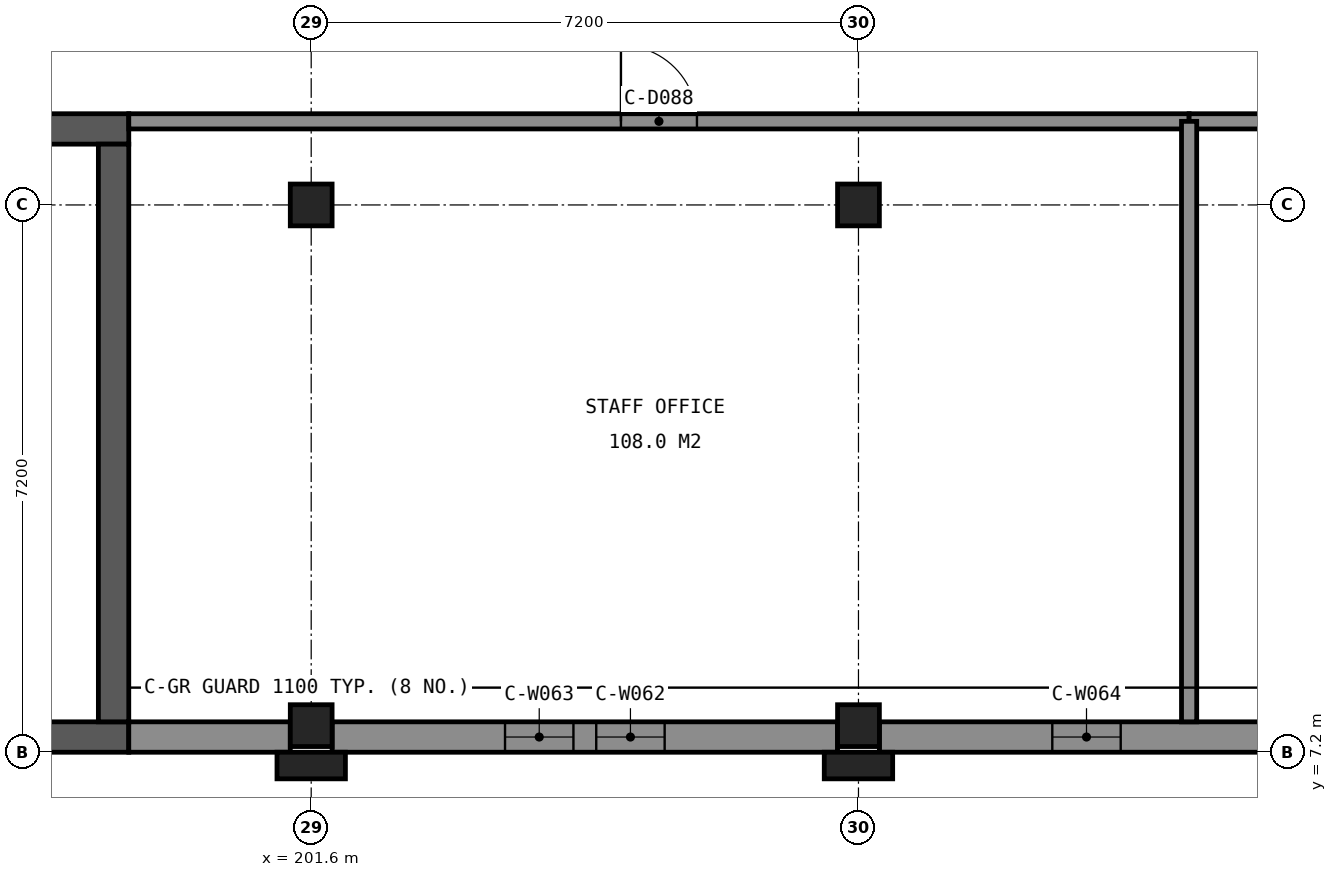
"""IFC4 building model, lengths in metres.
Left out: names, types, materials, properties, quantities, classifications, styles, units other than length and angle.
Written with IfcOpenShell. Run it as: python <this file> out.ifc"""

import sys

from ifc_helpers import new_model, si_unit, direction, frame, frame_2d, origin, origin_2d, place, context, subcontext, project, spatial, polyline, rectangle, outline, extrude, element, fill, save


model = new_model("IFC4")
c1 = context("Model", 3, precision=1e-05, world=origin(), true_north=direction((0.0, 1.0)))
c2 = subcontext(c1, "Body", "Model", "MODEL_VIEW")
j1 = project(units=[si_unit("LENGTHUNIT", "METRE"), si_unit("PLANEANGLEUNIT", "RADIAN")], contexts=[c1])
p1 = place(None, origin())
s1 = spatial("IfcSite", under=j1, at=p1, CompositionType="ELEMENT")
p2 = place(p1, origin())
s2 = spatial("IfcBuilding", under=s1, at=p2, CompositionType="ELEMENT")
p3 = place(p2, frame((0.0, 0.0, 14.4)))
s3 = spatial("IfcBuildingStorey", under=s2, at=p3, CompositionType="ELEMENT", Elevation=14.4)
for number, where, z_axis, x_axis in (
    (1, (201.6, 14.4, 0.0), (0.0, 0.0, 1.0), (1.0, 0.0, 0.0)),
    (2, (208.8, 14.4, 0.0), (0.0, 0.0, 1.0), (1.0, 0.0, 0.0)),
    (3, (201.6, 7.55, 0.0), (0.0, 0.0, 1.0), (1.0, 0.0, 0.0)),
    (4, (208.8, 7.55, 0.0), (0.0, 0.0, 1.0), (1.0, 0.0, 0.0)),
):
    element("IfcColumn", number, at=place(p3, frame(where, z_axis=z_axis, x_axis=x_axis)), inside=s3, PredefinedType="COLUMN", context=c2, shape_type="SweptSolid", body=[
        extrude(rectangle(XDim=0.55, YDim=0.55, at=origin_2d()), origin(), (0.0, 0.0, 1.0), 4.8),
    ])
p4 = place(p3, frame((199.2, 7.4, 0.0), z_axis=(0.0, 0.0, 1.0), x_axis=(-1.0, 0.0, 0.0)))
e5 = element("IfcWall", 5, at=p4, inside=s3, PredefinedType="SHEAR", context=c2, shape_type="SweptSolid", body=[
    extrude(rectangle(XDim=10.8, YDim=0.4, at=frame_2d((5.4, 0.0))), origin(), (0.0, 0.0, 1.0), 4.5),
])
p5 = place(p3, frame((201.325, 7.4, 0.0), z_axis=(0.0, 0.0, 1.0), x_axis=(-1.0, 0.0, 0.0)))
e6 = element("IfcWall", 6, at=p5, inside=s3, PredefinedType="SOLIDWALL", context=c2, shape_type="SweptSolid", body=[
    extrude(rectangle(XDim=2.125, YDim=0.4, at=frame_2d((1.062, 0.0))), origin(), (0.0, 0.0, 1.0), 3.7),
])
p6 = place(p3, frame((208.525, 7.4, 0.0), z_axis=(0.0, 0.0, 1.0), x_axis=(-1.0, 0.0, 0.0)))
e7 = element("IfcWall", 7, at=p6, inside=s3, PredefinedType="SOLIDWALL", context=c2, shape_type="SweptSolid", body=[
    extrude(rectangle(XDim=6.65, YDim=0.4, at=frame_2d((3.325, 0.0))), origin(), (0.0, 0.0, 1.0), 3.7),
])
p7 = place(p6, frame((2.275, 0.0, 1.8)))
e8 = element("IfcOpeningElement", 8, at=p7, cuts=e7, PredefinedType="OPENING", context=c2, shape_type="SweptSolid", body=[
    extrude(rectangle(XDim=0.9, YDim=1.2, at=frame_2d((0.45, 0.6))), frame((0.0, 0.21, 0.0), z_axis=(0.0, -1.0, 0.0), x_axis=(1.0, 0.0, 0.0)), (0.0, 0.0, 1.0), 0.42),
])
p8 = place(p6, frame((3.475, 0.0, 1.8)))
e9 = element("IfcOpeningElement", 9, at=p8, cuts=e7, PredefinedType="OPENING", context=c2, shape_type="SweptSolid", body=[
    extrude(rectangle(XDim=0.9, YDim=1.2, at=frame_2d((0.45, 0.6))), frame((0.0, 0.21, 0.0), z_axis=(0.0, -1.0, 0.0), x_axis=(1.0, 0.0, 0.0)), (0.0, 0.0, 1.0), 0.42),
])
p9 = place(p3, frame((215.725, 7.4, 0.0), z_axis=(0.0, 0.0, 1.0), x_axis=(-1.0, 0.0, 0.0)))
e10 = element("IfcWall", 10, at=p9, inside=s3, PredefinedType="SOLIDWALL", context=c2, shape_type="SweptSolid", body=[
    extrude(rectangle(XDim=6.65, YDim=0.4, at=frame_2d((3.325, 0.0))), origin(), (0.0, 0.0, 1.0), 3.7),
])
p10 = place(p9, frame((3.475, 0.0, 1.8)))
e11 = element("IfcOpeningElement", 11, at=p10, cuts=e10, PredefinedType="OPENING", context=c2, shape_type="SweptSolid", body=[
    extrude(rectangle(XDim=0.9, YDim=1.2, at=frame_2d((0.45, 0.6))), frame((0.0, 0.21, 0.0), z_axis=(0.0, -1.0, 0.0), x_axis=(1.0, 0.0, 0.0)), (0.0, 0.0, 1.0), 0.42),
])
p11 = place(p3, frame((188.4, 15.4, 0.0), z_axis=(0.0, 0.0, 1.0), x_axis=(1.0, 0.0, 0.0)))
e12 = element("IfcWall", 12, at=p11, inside=s3, PredefinedType="SHEAR", context=c2, shape_type="SweptSolid", body=[
    extrude(rectangle(XDim=10.8, YDim=0.4, at=frame_2d((5.4, 0.0))), origin(), (0.0, 0.0, 1.0), 4.5),
])
p12 = place(p11, frame((6.0, 0.0, 0.0)))
e13 = element("IfcOpeningElement", 13, at=p12, cuts=e12, PredefinedType="OPENING", context=c2, shape_type="SweptSolid", body=[
    extrude(rectangle(XDim=1.8, YDim=2.1, at=frame_2d((0.9, 1.05))), frame((0.0, 0.21, 0.0), z_axis=(0.0, -1.0, 0.0), x_axis=(1.0, 0.0, 0.0)), (0.0, 0.0, 1.0), 0.42),
])
p13 = place(p3, frame((199.0, 15.2, 0.0), z_axis=(0.0, 0.0, 1.0), x_axis=(0.0, -1.0, 0.0)))
e14 = element("IfcWall", 14, at=p13, inside=s3, PredefinedType="SHEAR", context=c2, shape_type="SweptSolid", body=[
    extrude(rectangle(XDim=7.6, YDim=0.4, at=frame_2d((3.8, 0.0))), origin(), (0.0, 0.0, 1.0), 4.5),
])
p14 = place(p3, frame((219.6, 7.4, 4.8), z_axis=(0.0, 0.0, 1.0), x_axis=(-1.0, 0.0, 0.0)))
e15 = element("IfcWall", 15, at=p14, inside=s3, PredefinedType="PARAPET", context=c2, shape_type="SweptSolid", body=[
    extrude(rectangle(XDim=20.4, YDim=0.4, at=frame_2d((10.2, 0.0))), origin(), (0.0, 0.0, 1.0), 0.4),
])
p15 = place(p3, frame((188.4, 15.45, 4.8), z_axis=(0.0, 0.0, 1.0), x_axis=(1.0, 0.0, 0.0)))
e16 = element("IfcWall", 16, at=p15, inside=s3, PredefinedType="SOLIDWALL", context=c2, shape_type="SweptSolid", body=[
    extrude(outline(polyline([(0.0, 0.0), (10.8, 0.0), (10.8, 2.15), (5.4, 2.45), (0.0, 2.15), (0.0, 0.0)])), frame((0.0, 0.15, 0.0), z_axis=(0.0, -1.0, 0.0), x_axis=(1.0, 0.0, 0.0)), (0.0, 0.0, 1.0), 0.3),
])
p16 = place(p15, frame((6.35, 0.0, 0.0)))
e17 = element("IfcOpeningElement", 17, at=p16, cuts=e16, PredefinedType="OPENING", context=c2, shape_type="SweptSolid", body=[
    extrude(rectangle(XDim=1.1, YDim=2.1, at=frame_2d((0.55, 1.05))), frame((0.0, 0.16, 0.0), z_axis=(0.0, -1.0, 0.0), x_axis=(1.0, 0.0, 0.0)), (0.0, 0.0, 1.0), 0.32),
])
p17 = place(p3, frame((188.4, 7.35, 4.8), z_axis=(0.0, 0.0, 1.0), x_axis=(1.0, 0.0, 0.0)))
e18 = element("IfcWall", 18, at=p17, inside=s3, PredefinedType="SOLIDWALL", context=c2, shape_type="SweptSolid", body=[
    extrude(outline(polyline([(0.0, 0.0), (10.8, 0.0), (10.8, 2.15), (5.4, 2.45), (0.0, 2.15), (0.0, 0.0)])), frame((0.0, 0.15, 0.0), z_axis=(0.0, -1.0, 0.0), x_axis=(1.0, 0.0, 0.0)), (0.0, 0.0, 1.0), 0.3),
])
p18 = place(p3, frame((199.05, 15.3, 4.8), z_axis=(0.0, 0.0, 1.0), x_axis=(0.0, -1.0, 0.0)))
e19 = element("IfcWall", 19, at=p18, inside=s3, PredefinedType="SOLIDWALL", context=c2, shape_type="SweptSolid", body=[
    extrude(rectangle(XDim=7.8, YDim=0.3, at=frame_2d((3.9, 0.0))), origin(), (0.0, 0.0, 1.0), 2.15),
])
for number, where, z_axis, x_axis in (
    (20, (201.6, 7.025, 0.0), (0.0, 0.0, 1.0), (1.0, 0.0, 0.0)),
    (21, (208.8, 7.025, 0.0), (0.0, 0.0, 1.0), (1.0, 0.0, 0.0)),
):
    element("IfcColumn", number, at=place(p3, frame(where, z_axis=z_axis, x_axis=x_axis)), inside=s3, PredefinedType="PILASTER", context=c2, shape_type="SweptSolid", body=[
        extrude(rectangle(XDim=0.9, YDim=0.35, at=origin_2d()), origin(), (0.0, 0.0, 1.0), 3.9),
    ])
p19 = place(p3, frame((230.4, 6.575, 4.5), z_axis=(0.0, 0.0, 1.0), x_axis=(-1.0, 0.0, 0.0)))
e22 = element("IfcWall", 22, at=p19, inside=s3, PredefinedType="SOLIDWALL", context=c2, shape_type="SweptSolid", body=[
    extrude(rectangle(XDim=72.75, YDim=0.25, at=frame_2d((36.375, 0.0))), origin(), (0.0, 0.0, 1.0), 0.65),
])
p20 = place(p3, frame((199.2, 15.5, 0.0), z_axis=(0.0, 0.0, 1.0), x_axis=(1.0, 0.0, 0.0)))
e23 = element("IfcWall", 23, at=p20, inside=s3, PredefinedType="PARTITIONING", context=c2, shape_type="SweptSolid", body=[
    extrude(rectangle(XDim=13.95, YDim=0.2, at=frame_2d((6.975, 0.0))), origin(), (0.0, 0.0, 1.0), 3.7),
])
p21 = place(p20, frame((6.475, 0.0, 0.0)))
e24 = element("IfcOpeningElement", 24, at=p21, cuts=e23, PredefinedType="OPENING", context=c2, shape_type="SweptSolid", body=[
    extrude(rectangle(XDim=1.0, YDim=2.1, at=frame_2d((0.5, 1.05))), frame((0.0, 0.11, 0.0), z_axis=(0.0, -1.0, 0.0), x_axis=(1.0, 0.0, 0.0)), (0.0, 0.0, 1.0), 0.22),
])
p22 = place(p3, frame((213.15, 15.5, 0.0), z_axis=(0.0, 0.0, 1.0), x_axis=(1.0, 0.0, 0.0)))
e25 = element("IfcWall", 25, at=p22, inside=s3, PredefinedType="PARTITIONING", context=c2, shape_type="SweptSolid", body=[
    extrude(rectangle(XDim=6.45, YDim=0.2, at=frame_2d((3.225, 0.0))), origin(), (0.0, 0.0, 1.0), 3.7),
])
p23 = place(p22, frame((3.325, 0.0, 0.0)))
e26 = element("IfcOpeningElement", 26, at=p23, cuts=e25, PredefinedType="OPENING", context=c2, shape_type="SweptSolid", body=[
    extrude(rectangle(XDim=1.0, YDim=2.1, at=frame_2d((0.5, 1.05))), frame((0.0, 0.11, 0.0), z_axis=(0.0, -1.0, 0.0), x_axis=(1.0, 0.0, 0.0)), (0.0, 0.0, 1.0), 0.22),
])
p24 = place(p3, frame((213.15, 15.5, 0.0), z_axis=(0.0, 0.0, 1.0), x_axis=(0.0, -1.0, 0.0)))
e27 = element("IfcWall", 27, at=p24, inside=s3, PredefinedType="PARTITIONING", context=c2, shape_type="SweptSolid", body=[
    extrude(rectangle(XDim=7.9, YDim=0.2, at=frame_2d((3.95, 0.0))), origin(), (0.0, 0.0, 1.0), 3.7),
])
p25 = place(p7, origin())
e28 = element("IfcWindow", 28, at=p25, inside=s3, PartitioningType="SINGLE_PANEL", PredefinedType="WINDOW", context=c2, shape_type="SweptSolid", body=[
    extrude(rectangle(XDim=0.9, YDim=1.2, at=frame_2d((0.45, 0.6))), frame((0.0, -0.09, 0.0), z_axis=(0.0, -1.0, 0.0), x_axis=(1.0, 0.0, 0.0)), (0.0, 0.0, 1.0), 0.06),
])
fill(e8, e28)
p26 = place(p8, origin())
e29 = element("IfcWindow", 29, at=p26, inside=s3, PartitioningType="SINGLE_PANEL", PredefinedType="WINDOW", context=c2, shape_type="SweptSolid", body=[
    extrude(rectangle(XDim=0.9, YDim=1.2, at=frame_2d((0.45, 0.6))), frame((0.0, -0.09, 0.0), z_axis=(0.0, -1.0, 0.0), x_axis=(1.0, 0.0, 0.0)), (0.0, 0.0, 1.0), 0.06),
])
fill(e9, e29)
p27 = place(p10, origin())
e30 = element("IfcWindow", 30, at=p27, inside=s3, PartitioningType="SINGLE_PANEL", PredefinedType="WINDOW", context=c2, shape_type="SweptSolid", body=[
    extrude(rectangle(XDim=0.9, YDim=1.2, at=frame_2d((0.45, 0.6))), frame((0.0, -0.09, 0.0), z_axis=(0.0, -1.0, 0.0), x_axis=(1.0, 0.0, 0.0)), (0.0, 0.0, 1.0), 0.06),
])
fill(e11, e30)
p28 = place(p21, origin())
e31 = element("IfcDoor", 31, at=p28, inside=s3, OperationType="NOTDEFINED", PredefinedType="DOOR", context=c2, shape_type="SweptSolid", body=[
    extrude(rectangle(XDim=1.0, YDim=2.1, at=frame_2d((0.5, 1.05))), frame((0.0, 0.025, 0.0), z_axis=(0.0, -1.0, 0.0), x_axis=(1.0, 0.0, 0.0)), (0.0, 0.0, 1.0), 0.05),
])
fill(e24, e31)
save(model, sys.argv[1])
